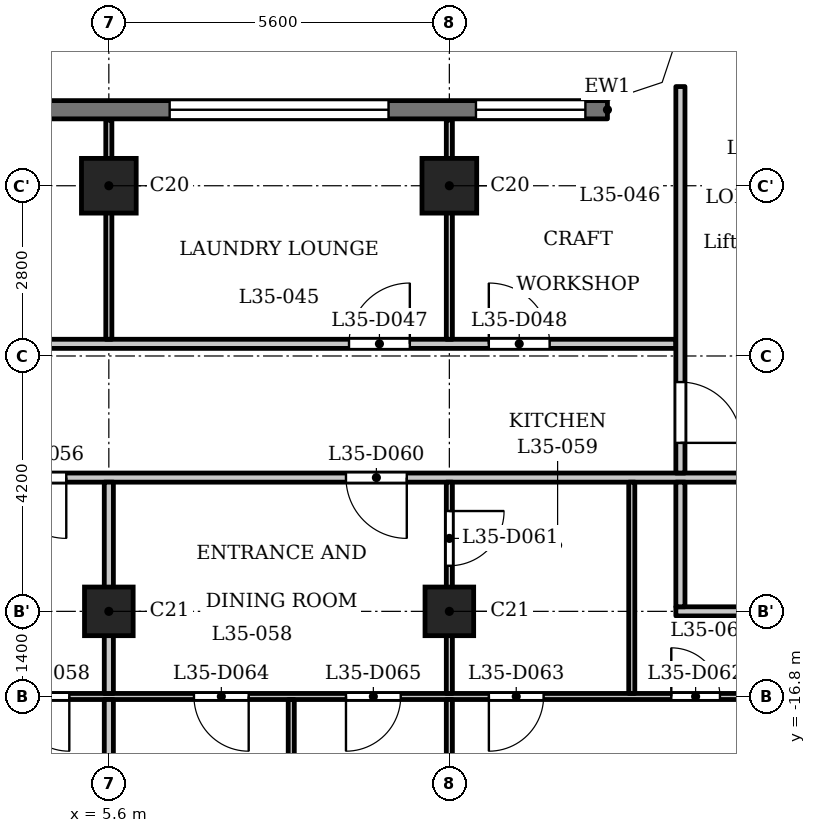
"""IFC4 building model, lengths in metres.
Left out: names, types, materials, properties, quantities, classifications, styles, units other than length and angle.
Written with IfcOpenShell. Run it as: python <this file> out.ifc"""

import sys

from ifc_helpers import new_model, si_unit, direction, frame, frame_2d, origin, origin_2d, place, context, subcontext, project, spatial, polyline, rectangle, outline, extrude, element, fill, save


model = new_model("IFC4")
c1 = context("Model", 3, precision=1e-05, world=origin(), true_north=direction((0.0, 1.0)))
c2 = subcontext(c1, "Body", "Model", "MODEL_VIEW")
j1 = project(units=[si_unit("LENGTHUNIT", "METRE"), si_unit("PLANEANGLEUNIT", "RADIAN")], contexts=[c1])
p1 = place(None, origin())
s1 = spatial("IfcSite", under=j1, at=p1, CompositionType="ELEMENT")
p2 = place(p1, origin())
s2 = spatial("IfcBuilding", under=s1, at=p2, CompositionType="ELEMENT")
p3 = place(p2, frame((0.0, 0.0, 139.6)))
s3 = spatial("IfcBuildingStorey", under=s2, at=p3, CompositionType="ELEMENT", Elevation=139.6)
for number, where, z_axis, x_axis in (
    (1, (5.6, -8.4, 0.0), (0.0, 0.0, 1.0), (1.0, 0.0, 0.0)),
    (2, (11.2, -8.4, 0.0), (0.0, 0.0, 1.0), (1.0, 0.0, 0.0)),
):
    element("IfcColumn", number, at=place(p3, frame(where, z_axis=z_axis, x_axis=x_axis)), inside=s3, PredefinedType="COLUMN", context=c2, shape_type="SweptSolid", body=[
        extrude(rectangle(XDim=0.9, YDim=0.9, at=origin_2d()), origin(), (0.0, 0.0, 1.0), 3.5),
    ])
for number, where, z_axis, x_axis in (
    (3, (5.6, -15.4, 0.0), (0.0, 0.0, 1.0), (1.0, 0.0, 0.0)),
    (4, (11.2, -15.4, 0.0), (0.0, 0.0, 1.0), (1.0, 0.0, 0.0)),
):
    element("IfcColumn", number, at=place(p3, frame(where, z_axis=z_axis, x_axis=x_axis)), inside=s3, PredefinedType="COLUMN", context=c2, shape_type="SweptSolid", body=[
        extrude(rectangle(XDim=0.8, YDim=0.8, at=origin_2d()), origin(), (0.0, 0.0, 1.0), 3.5),
    ])
p4 = place(p3, frame((13.8, -7.15, 0.0), z_axis=(0.0, 0.0, 1.0), x_axis=(-1.0, 0.0, 0.0)))
e5 = element("IfcWall", 5, at=p4, inside=s3, PredefinedType="SOLIDWALL", context=c2, shape_type="SweptSolid", body=[
    extrude(rectangle(XDim=27.6, YDim=0.3, at=frame_2d((13.8, 0.0))), origin(), (0.0, 0.0, 1.0), 3.2),
])
p5 = place(p4, frame((0.363, 0.0, 0.9)))
e6 = element("IfcOpeningElement", 6, at=p5, cuts=e5, PredefinedType="OPENING", context=c2, shape_type="SweptSolid", body=[
    extrude(rectangle(XDim=1.8, YDim=1.25, at=frame_2d((0.9, 0.625))), frame((0.0, 0.16, 0.0), z_axis=(0.0, -1.0, 0.0), x_axis=(1.0, 0.0, 0.0)), (0.0, 0.0, 1.0), 0.32),
])
p6 = place(p4, frame((3.6, 0.0, 1.2)))
e7 = element("IfcOpeningElement", 7, at=p6, cuts=e5, PredefinedType="OPENING", context=c2, shape_type="SweptSolid", body=[
    extrude(rectangle(XDim=3.6, YDim=0.95, at=frame_2d((1.8, 0.475))), frame((0.0, 0.16, 0.0), z_axis=(0.0, -1.0, 0.0), x_axis=(1.0, 0.0, 0.0)), (0.0, 0.0, 1.0), 0.32),
])
p7 = place(p4, frame((9.2, 0.0, 1.2)))
e8 = element("IfcOpeningElement", 8, at=p7, cuts=e5, PredefinedType="OPENING", context=c2, shape_type="SweptSolid", body=[
    extrude(rectangle(XDim=3.6, YDim=0.95, at=frame_2d((1.8, 0.475))), frame((0.0, 0.16, 0.0), z_axis=(0.0, -1.0, 0.0), x_axis=(1.0, 0.0, 0.0)), (0.0, 0.0, 1.0), 0.32),
])
p8 = place(p4, frame((14.8, 0.0, 1.2)))
e9 = element("IfcOpeningElement", 9, at=p8, cuts=e5, PredefinedType="OPENING", context=c2, shape_type="SweptSolid", body=[
    extrude(rectangle(XDim=3.6, YDim=0.95, at=frame_2d((1.8, 0.475))), frame((0.0, 0.16, 0.0), z_axis=(0.0, -1.0, 0.0), x_axis=(1.0, 0.0, 0.0)), (0.0, 0.0, 1.0), 0.32),
])
p9 = place(p4, frame((20.4, 0.0, 1.2)))
e10 = element("IfcOpeningElement", 10, at=p9, cuts=e5, PredefinedType="OPENING", context=c2, shape_type="SweptSolid", body=[
    extrude(rectangle(XDim=3.6, YDim=0.95, at=frame_2d((1.8, 0.475))), frame((0.0, 0.16, 0.0), z_axis=(0.0, -1.0, 0.0), x_axis=(1.0, 0.0, 0.0)), (0.0, 0.0, 1.0), 0.32),
])
p10 = place(p4, frame((25.438, 0.0, 0.9)))
e11 = element("IfcOpeningElement", 11, at=p10, cuts=e5, PredefinedType="OPENING", context=c2, shape_type="SweptSolid", body=[
    extrude(rectangle(XDim=1.8, YDim=1.25, at=frame_2d((0.9, 0.625))), frame((0.0, 0.16, 0.0), z_axis=(0.0, -1.0, 0.0), x_axis=(1.0, 0.0, 0.0)), (0.0, 0.0, 1.0), 0.32),
])
p11 = place(p3, frame((-16.725, -16.8, 0.0), z_axis=(0.0, 0.0, 1.0), x_axis=(1.0, 0.0, 0.0)))
e12 = element("IfcWall", 12, at=p11, inside=s3, PredefinedType="PARTITIONING", context=c2, shape_type="SweptSolid", body=[
    extrude(rectangle(XDim=33.45, YDim=0.1, at=frame_2d((16.725, 0.0))), origin(), (0.0, 0.0, 1.0), 3.2),
])
p12 = place(p11, frame((0.575, 0.0, 0.0)))
e13 = element("IfcOpeningElement", 13, at=p12, cuts=e12, PredefinedType="OPENING", context=c2, shape_type="SweptSolid", body=[
    extrude(rectangle(XDim=0.8, YDim=2.1, at=frame_2d((0.4, 1.05))), frame((0.0, 0.06, 0.0), z_axis=(0.0, -1.0, 0.0), x_axis=(1.0, 0.0, 0.0)), (0.0, 0.0, 1.0), 0.12),
])
p13 = place(p11, frame((6.175, 0.0, 0.0)))
e14 = element("IfcOpeningElement", 14, at=p13, cuts=e12, PredefinedType="OPENING", context=c2, shape_type="SweptSolid", body=[
    extrude(rectangle(XDim=0.9, YDim=2.1, at=frame_2d((0.45, 1.05))), frame((0.0, 0.06, 0.0), z_axis=(0.0, -1.0, 0.0), x_axis=(1.0, 0.0, 0.0)), (0.0, 0.0, 1.0), 0.12),
])
p14 = place(p11, frame((15.275, 0.0, 0.0)))
e15 = element("IfcOpeningElement", 15, at=p14, cuts=e12, PredefinedType="OPENING", context=c2, shape_type="SweptSolid", body=[
    extrude(rectangle(XDim=0.8, YDim=2.1, at=frame_2d((0.4, 1.05))), frame((0.0, 0.06, 0.0), z_axis=(0.0, -1.0, 0.0), x_axis=(1.0, 0.0, 0.0)), (0.0, 0.0, 1.0), 0.12),
])
p15 = place(p11, frame((11.775, 0.0, 0.0)))
e16 = element("IfcOpeningElement", 16, at=p15, cuts=e12, PredefinedType="OPENING", context=c2, shape_type="SweptSolid", body=[
    extrude(rectangle(XDim=0.9, YDim=2.1, at=frame_2d((0.45, 1.05))), frame((0.0, 0.06, 0.0), z_axis=(0.0, -1.0, 0.0), x_axis=(1.0, 0.0, 0.0)), (0.0, 0.0, 1.0), 0.12),
])
p16 = place(p11, frame((17.275, 0.0, 0.0)))
e17 = element("IfcOpeningElement", 17, at=p16, cuts=e12, PredefinedType="OPENING", context=c2, shape_type="SweptSolid", body=[
    extrude(rectangle(XDim=0.8, YDim=2.1, at=frame_2d((0.4, 1.05))), frame((0.0, 0.06, 0.0), z_axis=(0.0, -1.0, 0.0), x_axis=(1.0, 0.0, 0.0)), (0.0, 0.0, 1.0), 0.12),
])
p17 = place(p11, frame((20.775, 0.0, 0.0)))
e18 = element("IfcOpeningElement", 18, at=p17, cuts=e12, PredefinedType="OPENING", context=c2, shape_type="SweptSolid", body=[
    extrude(rectangle(XDim=0.9, YDim=2.1, at=frame_2d((0.45, 1.05))), frame((0.0, 0.06, 0.0), z_axis=(0.0, -1.0, 0.0), x_axis=(1.0, 0.0, 0.0)), (0.0, 0.0, 1.0), 0.12),
])
p18 = place(p11, frame((31.575, 0.0, 0.0)))
e19 = element("IfcOpeningElement", 19, at=p18, cuts=e12, PredefinedType="OPENING", context=c2, shape_type="SweptSolid", body=[
    extrude(rectangle(XDim=0.8, YDim=2.1, at=frame_2d((0.4, 1.05))), frame((0.0, 0.06, 0.0), z_axis=(0.0, -1.0, 0.0), x_axis=(1.0, 0.0, 0.0)), (0.0, 0.0, 1.0), 0.12),
])
p19 = place(p11, frame((28.575, 0.0, 0.0)))
e20 = element("IfcOpeningElement", 20, at=p19, cuts=e12, PredefinedType="OPENING", context=c2, shape_type="SweptSolid", body=[
    extrude(rectangle(XDim=0.9, YDim=2.1, at=frame_2d((0.45, 1.05))), frame((0.0, 0.06, 0.0), z_axis=(0.0, -1.0, 0.0), x_axis=(1.0, 0.0, 0.0)), (0.0, 0.0, 1.0), 0.12),
])
p20 = place(p11, frame((23.725, 0.0, 0.0)))
e21 = element("IfcOpeningElement", 21, at=p20, cuts=e12, PredefinedType="OPENING", context=c2, shape_type="SweptSolid", body=[
    extrude(rectangle(XDim=0.9, YDim=2.1, at=frame_2d((0.45, 1.05))), frame((0.0, 0.06, 0.0), z_axis=(0.0, -1.0, 0.0), x_axis=(1.0, 0.0, 0.0)), (0.0, 0.0, 1.0), 0.12),
])
p21 = place(p11, frame((26.225, 0.0, 0.0)))
e22 = element("IfcOpeningElement", 22, at=p21, cuts=e12, PredefinedType="OPENING", context=c2, shape_type="SweptSolid", body=[
    extrude(rectangle(XDim=0.9, YDim=2.1, at=frame_2d((0.45, 1.05))), frame((0.0, 0.06, 0.0), z_axis=(0.0, -1.0, 0.0), x_axis=(1.0, 0.0, 0.0)), (0.0, 0.0, 1.0), 0.12),
])
p22 = place(p3, frame((14.925, -15.4, 0.0), z_axis=(0.0, 0.0, 1.0), x_axis=(1.0, 0.0, 0.0)))
e23 = element("IfcWall", 23, at=p22, inside=s3, PredefinedType="PARTITIONING", context=c2, shape_type="SweptSolid", body=[
    extrude(rectangle(XDim=12.559, YDim=0.15, at=frame_2d((6.279, 0.0))), origin(), (0.0, 0.0, 1.0), 3.2),
])
p23 = place(p22, frame((5.775, 0.0, 0.0)))
e24 = element("IfcOpeningElement", 24, at=p23, cuts=e23, PredefinedType="OPENING", context=c2, shape_type="SweptSolid", body=[
    extrude(rectangle(XDim=1.0, YDim=2.1, at=frame_2d((0.5, 1.05))), frame((0.0, 0.085, 0.0), z_axis=(0.0, -1.0, 0.0), x_axis=(1.0, 0.0, 0.0)), (0.0, 0.0, 1.0), 0.17),
])
p24 = place(p3, frame((-17.4, -13.2, 0.0), z_axis=(0.0, 0.0, 1.0), x_axis=(1.0, 0.0, 0.0)))
e25 = element("IfcWall", 25, at=p24, inside=s3, PredefinedType="PARTITIONING", context=c2, shape_type="SweptSolid", body=[
    extrude(rectangle(XDim=34.8, YDim=0.15, at=frame_2d((17.4, 0.0))), origin(), (0.0, 0.0, 1.0), 3.2),
])
p25 = place(p24, frame((0.15, 0.0, 0.0)))
e26 = element("IfcOpeningElement", 26, at=p25, cuts=e25, PredefinedType="OPENING", context=c2, shape_type="SweptSolid", body=[
    extrude(rectangle(XDim=1.0, YDim=2.1, at=frame_2d((0.5, 1.05))), frame((0.0, 0.085, 0.0), z_axis=(0.0, -1.0, 0.0), x_axis=(1.0, 0.0, 0.0)), (0.0, 0.0, 1.0), 0.17),
])
p26 = place(p24, frame((33.55, 0.0, 0.0)))
e27 = element("IfcOpeningElement", 27, at=p26, cuts=e25, PredefinedType="OPENING", context=c2, shape_type="SweptSolid", body=[
    extrude(rectangle(XDim=1.0, YDim=2.1, at=frame_2d((0.5, 1.05))), frame((0.0, 0.085, 0.0), z_axis=(0.0, -1.0, 0.0), x_axis=(1.0, 0.0, 0.0)), (0.0, 0.0, 1.0), 0.17),
])
p27 = place(p24, frame((6.85, 0.0, 0.0)))
e28 = element("IfcOpeningElement", 28, at=p27, cuts=e25, PredefinedType="OPENING", context=c2, shape_type="SweptSolid", body=[
    extrude(rectangle(XDim=1.0, YDim=2.1, at=frame_2d((0.5, 1.05))), frame((0.0, 0.085, 0.0), z_axis=(0.0, -1.0, 0.0), x_axis=(1.0, 0.0, 0.0)), (0.0, 0.0, 1.0), 0.17),
])
p28 = place(p24, frame((12.45, 0.0, 0.0)))
e29 = element("IfcOpeningElement", 29, at=p28, cuts=e25, PredefinedType="OPENING", context=c2, shape_type="SweptSolid", body=[
    extrude(rectangle(XDim=1.0, YDim=2.1, at=frame_2d((0.5, 1.05))), frame((0.0, 0.085, 0.0), z_axis=(0.0, -1.0, 0.0), x_axis=(1.0, 0.0, 0.0)), (0.0, 0.0, 1.0), 0.17),
])
p29 = place(p24, frame((21.3, 0.0, 0.0)))
e30 = element("IfcOpeningElement", 30, at=p29, cuts=e25, PredefinedType="OPENING", context=c2, shape_type="SweptSolid", body=[
    extrude(rectangle(XDim=1.0, YDim=2.1, at=frame_2d((0.5, 1.05))), frame((0.0, 0.085, 0.0), z_axis=(0.0, -1.0, 0.0), x_axis=(1.0, 0.0, 0.0)), (0.0, 0.0, 1.0), 0.17),
])
p30 = place(p24, frame((26.9, 0.0, 0.0)))
e31 = element("IfcOpeningElement", 31, at=p30, cuts=e25, PredefinedType="OPENING", context=c2, shape_type="SweptSolid", body=[
    extrude(rectangle(XDim=1.0, YDim=2.1, at=frame_2d((0.5, 1.05))), frame((0.0, 0.085, 0.0), z_axis=(0.0, -1.0, 0.0), x_axis=(1.0, 0.0, 0.0)), (0.0, 0.0, 1.0), 0.17),
])
p31 = place(p3, frame((-14.925, -11.0, 0.0), z_axis=(0.0, 0.0, 1.0), x_axis=(1.0, 0.0, 0.0)))
e32 = element("IfcWall", 32, at=p31, inside=s3, PredefinedType="PARTITIONING", context=c2, shape_type="SweptSolid", body=[
    extrude(rectangle(XDim=29.85, YDim=0.15, at=frame_2d((14.925, 0.0))), origin(), (0.0, 0.0, 1.0), 3.2),
])
p32 = place(p31, frame((2.075, 0.0, 0.0)))
e33 = element("IfcOpeningElement", 33, at=p32, cuts=e32, PredefinedType="OPENING", context=c2, shape_type="SweptSolid", body=[
    extrude(rectangle(XDim=1.0, YDim=2.1, at=frame_2d((0.5, 1.05))), frame((0.0, 0.085, 0.0), z_axis=(0.0, -1.0, 0.0), x_axis=(1.0, 0.0, 0.0)), (0.0, 0.0, 1.0), 0.17),
])
p33 = place(p31, frame((4.425, 0.0, 0.0)))
e34 = element("IfcOpeningElement", 34, at=p33, cuts=e32, PredefinedType="OPENING", context=c2, shape_type="SweptSolid", body=[
    extrude(rectangle(XDim=1.0, YDim=2.1, at=frame_2d((0.5, 1.05))), frame((0.0, 0.085, 0.0), z_axis=(0.0, -1.0, 0.0), x_axis=(1.0, 0.0, 0.0)), (0.0, 0.0, 1.0), 0.17),
])
p34 = place(p31, frame((13.275, 0.0, 0.0)))
e35 = element("IfcOpeningElement", 35, at=p34, cuts=e32, PredefinedType="OPENING", context=c2, shape_type="SweptSolid", body=[
    extrude(rectangle(XDim=1.0, YDim=2.1, at=frame_2d((0.5, 1.05))), frame((0.0, 0.085, 0.0), z_axis=(0.0, -1.0, 0.0), x_axis=(1.0, 0.0, 0.0)), (0.0, 0.0, 1.0), 0.17),
])
p35 = place(p31, frame((15.625, 0.0, 0.0)))
e36 = element("IfcOpeningElement", 36, at=p35, cuts=e32, PredefinedType="OPENING", context=c2, shape_type="SweptSolid", body=[
    extrude(rectangle(XDim=1.0, YDim=2.1, at=frame_2d((0.5, 1.05))), frame((0.0, 0.085, 0.0), z_axis=(0.0, -1.0, 0.0), x_axis=(1.0, 0.0, 0.0)), (0.0, 0.0, 1.0), 0.17),
])
p36 = place(p31, frame((24.475, 0.0, 0.0)))
e37 = element("IfcOpeningElement", 37, at=p36, cuts=e32, PredefinedType="OPENING", context=c2, shape_type="SweptSolid", body=[
    extrude(rectangle(XDim=1.0, YDim=2.1, at=frame_2d((0.5, 1.05))), frame((0.0, 0.085, 0.0), z_axis=(0.0, -1.0, 0.0), x_axis=(1.0, 0.0, 0.0)), (0.0, 0.0, 1.0), 0.17),
])
p37 = place(p31, frame((26.774, 0.0, 0.0)))
e38 = element("IfcOpeningElement", 38, at=p37, cuts=e32, PredefinedType="OPENING", context=c2, shape_type="SweptSolid", body=[
    extrude(rectangle(XDim=1.0, YDim=2.1, at=frame_2d((0.5, 1.05))), frame((0.0, 0.085, 0.0), z_axis=(0.0, -1.0, 0.0), x_axis=(1.0, 0.0, 0.0)), (0.0, 0.0, 1.0), 0.17),
])
p38 = place(p3, frame((5.6, -10.925, 0.0), z_axis=(0.0, 0.0, 1.0), x_axis=(0.0, 1.0, 0.0)))
e39 = element("IfcWall", 39, at=p38, inside=s3, PredefinedType="PARTITIONING", context=c2, shape_type="SweptSolid", body=[
    extrude(rectangle(XDim=3.605, YDim=0.1, at=frame_2d((1.802, 0.0))), origin(), (0.0, 0.0, 1.0), 3.2),
])
p39 = place(p3, frame((5.6, -22.93, 0.0), z_axis=(0.0, 0.0, 1.0), x_axis=(0.0, 1.0, 0.0)))
e40 = element("IfcWall", 40, at=p39, inside=s3, PredefinedType="PARTITIONING", context=c2, shape_type="SweptSolid", body=[
    extrude(rectangle(XDim=6.08, YDim=0.15, at=frame_2d((3.04, 0.0))), origin(), (0.0, 0.0, 1.0), 3.2),
])
p40 = place(p3, frame((5.6, -16.75, 0.0), z_axis=(0.0, 0.0, 1.0), x_axis=(0.0, 1.0, 0.0)))
e41 = element("IfcWall", 41, at=p40, inside=s3, PredefinedType="PARTITIONING", context=c2, shape_type="SweptSolid", body=[
    extrude(rectangle(XDim=3.475, YDim=0.15, at=frame_2d((1.738, 0.0))), origin(), (0.0, 0.0, 1.0), 3.2),
])
p41 = place(p3, frame((8.6, -22.08, 0.0), z_axis=(0.0, 0.0, 1.0), x_axis=(0.0, 1.0, 0.0)))
e42 = element("IfcWall", 42, at=p41, inside=s3, PredefinedType="PARTITIONING", context=c2, shape_type="SweptSolid", body=[
    extrude(rectangle(XDim=5.23, YDim=0.1, at=frame_2d((2.615, 0.0))), origin(), (0.0, 0.0, 1.0), 3.2),
])
p42 = place(p3, frame((11.2, -22.93, 0.0), z_axis=(0.0, 0.0, 1.0), x_axis=(0.0, 1.0, 0.0)))
e43 = element("IfcWall", 43, at=p42, inside=s3, PredefinedType="PARTITIONING", context=c2, shape_type="SweptSolid", body=[
    extrude(rectangle(XDim=6.08, YDim=0.1, at=frame_2d((3.04, 0.0))), origin(), (0.0, 0.0, 1.0), 3.2),
])
p43 = place(p3, frame((11.2, -16.75, 0.0), z_axis=(0.0, 0.0, 1.0), x_axis=(0.0, 1.0, 0.0)))
e44 = element("IfcWall", 44, at=p43, inside=s3, PredefinedType="PARTITIONING", context=c2, shape_type="SweptSolid", body=[
    extrude(rectangle(XDim=3.475, YDim=0.1, at=frame_2d((1.738, 0.0))), origin(), (0.0, 0.0, 1.0), 3.2),
])
p44 = place(p43, frame((2.1, 0.0, 0.0)))
e45 = element("IfcOpeningElement", 45, at=p44, cuts=e44, PredefinedType="OPENING", context=c2, shape_type="SweptSolid", body=[
    extrude(rectangle(XDim=0.9, YDim=2.1, at=frame_2d((0.45, 1.05))), frame((0.0, 0.06, 0.0), z_axis=(0.0, -1.0, 0.0), x_axis=(1.0, 0.0, 0.0)), (0.0, 0.0, 1.0), 0.12),
])
p45 = place(p3, frame((11.2, -10.925, 0.0), z_axis=(0.0, 0.0, 1.0), x_axis=(0.0, 1.0, 0.0)))
e46 = element("IfcWall", 46, at=p45, inside=s3, PredefinedType="PARTITIONING", context=c2, shape_type="SweptSolid", body=[
    extrude(rectangle(XDim=3.605, YDim=0.1, at=frame_2d((1.802, 0.0))), origin(), (0.0, 0.0, 1.0), 3.2),
])
p46 = place(p3, frame((14.2, -16.75, 0.0), z_axis=(0.0, 0.0, 1.0), x_axis=(0.0, 1.0, 0.0)))
e47 = element("IfcWall", 47, at=p46, inside=s3, PredefinedType="PARTITIONING", context=c2, shape_type="SweptSolid", body=[
    extrude(rectangle(XDim=3.475, YDim=0.1, at=frame_2d((1.738, 0.0))), origin(), (0.0, 0.0, 1.0), 3.2),
])
p47 = place(p3, frame((15.0, -15.325, 0.0), z_axis=(0.0, 0.0, 1.0), x_axis=(0.0, 1.0, 0.0)))
e48 = element("IfcWall", 48, at=p47, inside=s3, PredefinedType="PARTITIONING", context=c2, shape_type="SweptSolid", body=[
    extrude(rectangle(XDim=2.05, YDim=0.15, at=frame_2d((1.025, 0.0))), origin(), (0.0, 0.0, 1.0), 3.2),
])
p48 = place(p3, frame((15.0, -13.125, 0.0), z_axis=(0.0, 0.0, 1.0), x_axis=(0.0, 1.0, 0.0)))
e49 = element("IfcWall", 49, at=p48, inside=s3, PredefinedType="PARTITIONING", context=c2, shape_type="SweptSolid", body=[
    extrude(rectangle(XDim=6.356, YDim=0.15, at=frame_2d((3.178, 0.0))), origin(), (0.0, 0.0, 1.0), 3.2),
])
p49 = place(p48, frame((0.496, 0.0, 0.0)))
e50 = element("IfcOpeningElement", 50, at=p49, cuts=e49, PredefinedType="OPENING", context=c2, shape_type="SweptSolid", body=[
    extrude(rectangle(XDim=1.0, YDim=2.1, at=frame_2d((0.5, 1.05))), frame((0.0, 0.085, 0.0), z_axis=(0.0, -1.0, 0.0), x_axis=(1.0, 0.0, 0.0)), (0.0, 0.0, 1.0), 0.17),
])
p50 = place(p3, origin())
e51 = element("IfcWall", 51, at=p50, inside=s3, PredefinedType="SOLIDWALL", context=c2, shape_type="SweptSolid", body=[
    extrude(outline(polyline([(14.937, -6.937), (15.3, -5.849), (15.3, -5.8), (15.0, -5.8), (14.7, -6.7), (13.8, -7.0), (13.8, -7.3), (13.849, -7.3), (14.937, -6.937)])), origin(), (0.0, 0.0, 1.0), 3.2),
])
p51 = place(p49, origin())
e52 = element("IfcDoor", 52, at=p51, inside=s3, OperationType="SINGLE_SWING_LEFT", PredefinedType="DOOR", context=c2, shape_type="SweptSolid", body=[
    extrude(rectangle(XDim=1.0, YDim=2.1, at=frame_2d((0.5, 1.05))), frame((0.0, 0.025, 0.0), z_axis=(0.0, -1.0, 0.0), x_axis=(1.0, 0.0, 0.0)), (0.0, 0.0, 1.0), 0.05),
])
fill(e50, e52)
p52 = place(p36, origin())
e53 = element("IfcDoor", 53, at=p52, inside=s3, OperationType="SINGLE_SWING_LEFT", PredefinedType="DOOR", context=c2, shape_type="SweptSolid", body=[
    extrude(rectangle(XDim=1.0, YDim=2.1, at=frame_2d((0.5, 1.05))), frame((0.0, 0.025, 0.0), z_axis=(0.0, -1.0, 0.0), x_axis=(1.0, 0.0, 0.0)), (0.0, 0.0, 1.0), 0.05),
])
fill(e37, e53)
p53 = place(p37, origin())
e54 = element("IfcDoor", 54, at=p53, inside=s3, OperationType="SINGLE_SWING_RIGHT", PredefinedType="DOOR", context=c2, shape_type="SweptSolid", body=[
    extrude(rectangle(XDim=1.0, YDim=2.1, at=frame_2d((0.5, 1.05))), frame((0.0, 0.025, 0.0), z_axis=(0.0, -1.0, 0.0), x_axis=(1.0, 0.0, 0.0)), (0.0, 0.0, 1.0), 0.05),
])
fill(e38, e54)
p54 = place(p29, origin())
e55 = element("IfcDoor", 55, at=p54, inside=s3, OperationType="SINGLE_SWING_RIGHT", PredefinedType="DOOR", context=c2, shape_type="SweptSolid", body=[
    extrude(rectangle(XDim=1.0, YDim=2.1, at=frame_2d((0.5, 1.05))), frame((0.0, 0.025, 0.0), z_axis=(0.0, -1.0, 0.0), x_axis=(1.0, 0.0, 0.0)), (0.0, 0.0, 1.0), 0.05),
])
fill(e30, e55)
p55 = place(p17, origin())
e56 = element("IfcDoor", 56, at=p55, inside=s3, OperationType="SINGLE_SWING_RIGHT", PredefinedType="DOOR", context=c2, shape_type="SweptSolid", body=[
    extrude(rectangle(XDim=0.9, YDim=2.1, at=frame_2d((0.45, 1.05))), frame((0.0, 0.025, 0.0), z_axis=(0.0, -1.0, 0.0), x_axis=(1.0, 0.0, 0.0)), (0.0, 0.0, 1.0), 0.05),
])
fill(e18, e56)
p56 = place(p30, origin())
e57 = element("IfcDoor", 57, at=p56, inside=s3, OperationType="SINGLE_SWING_RIGHT", PredefinedType="DOOR", context=c2, shape_type="SweptSolid", body=[
    extrude(rectangle(XDim=1.0, YDim=2.1, at=frame_2d((0.5, 1.05))), frame((0.0, 0.025, 0.0), z_axis=(0.0, -1.0, 0.0), x_axis=(1.0, 0.0, 0.0)), (0.0, 0.0, 1.0), 0.05),
])
fill(e31, e57)
p57 = place(p44, origin())
e58 = element("IfcDoor", 58, at=p57, inside=s3, OperationType="SINGLE_SWING_RIGHT", PredefinedType="DOOR", context=c2, shape_type="SweptSolid", body=[
    extrude(rectangle(XDim=0.9, YDim=2.1, at=frame_2d((0.45, 1.05))), frame((0.0, 0.025, 0.0), z_axis=(0.0, -1.0, 0.0), x_axis=(1.0, 0.0, 0.0)), (0.0, 0.0, 1.0), 0.05),
])
fill(e45, e58)
p58 = place(p18, origin())
e59 = element("IfcDoor", 59, at=p58, inside=s3, OperationType="SINGLE_SWING_RIGHT", PredefinedType="DOOR", context=c2, shape_type="SweptSolid", body=[
    extrude(rectangle(XDim=0.8, YDim=2.1, at=frame_2d((0.4, 1.05))), frame((0.0, 0.025, 0.0), z_axis=(0.0, -1.0, 0.0), x_axis=(1.0, 0.0, 0.0)), (0.0, 0.0, 1.0), 0.05),
])
fill(e19, e59)
p59 = place(p19, origin())
e60 = element("IfcDoor", 60, at=p59, inside=s3, OperationType="SINGLE_SWING_LEFT", PredefinedType="DOOR", context=c2, shape_type="SweptSolid", body=[
    extrude(rectangle(XDim=0.9, YDim=2.1, at=frame_2d((0.45, 1.05))), frame((0.0, 0.025, 0.0), z_axis=(0.0, -1.0, 0.0), x_axis=(1.0, 0.0, 0.0)), (0.0, 0.0, 1.0), 0.05),
])
fill(e20, e60)
p60 = place(p20, origin())
e61 = element("IfcDoor", 61, at=p60, inside=s3, OperationType="SINGLE_SWING_RIGHT", PredefinedType="DOOR", context=c2, shape_type="SweptSolid", body=[
    extrude(rectangle(XDim=0.9, YDim=2.1, at=frame_2d((0.45, 1.05))), frame((0.0, 0.025, 0.0), z_axis=(0.0, -1.0, 0.0), x_axis=(1.0, 0.0, 0.0)), (0.0, 0.0, 1.0), 0.05),
])
fill(e21, e61)
p61 = place(p21, origin())
e62 = element("IfcDoor", 62, at=p61, inside=s3, OperationType="SINGLE_SWING_LEFT", PredefinedType="DOOR", context=c2, shape_type="SweptSolid", body=[
    extrude(rectangle(XDim=0.9, YDim=2.1, at=frame_2d((0.45, 1.05))), frame((0.0, 0.025, 0.0), z_axis=(0.0, -1.0, 0.0), x_axis=(1.0, 0.0, 0.0)), (0.0, 0.0, 1.0), 0.05),
])
fill(e22, e62)
p62 = place(p5, origin())
e63 = element("IfcWindow", 63, at=p62, inside=s3, PartitioningType="SINGLE_PANEL", PredefinedType="WINDOW", context=c2, shape_type="SweptSolid", body=[
    extrude(rectangle(XDim=1.8, YDim=1.25, at=frame_2d((0.9, 0.625))), frame((0.0, 0.03, 0.0), z_axis=(0.0, -1.0, 0.0), x_axis=(1.0, 0.0, 0.0)), (0.0, 0.0, 1.0), 0.06),
])
fill(e6, e63)
p63 = place(p6, origin())
e64 = element("IfcWindow", 64, at=p63, inside=s3, PartitioningType="SINGLE_PANEL", PredefinedType="WINDOW", context=c2, shape_type="SweptSolid", body=[
    extrude(rectangle(XDim=3.6, YDim=0.95, at=frame_2d((1.8, 0.475))), frame((0.0, 0.03, 0.0), z_axis=(0.0, -1.0, 0.0), x_axis=(1.0, 0.0, 0.0)), (0.0, 0.0, 1.0), 0.06),
])
fill(e7, e64)
save(model, sys.argv[1])
